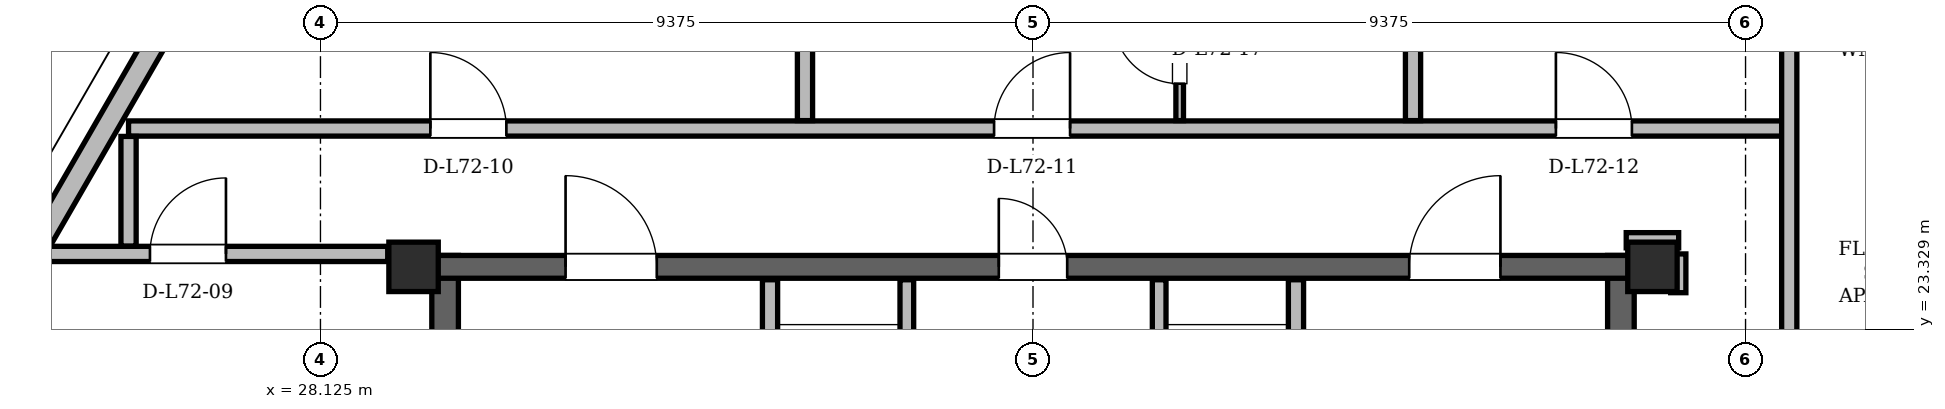
"""IFC4 building model, lengths in metres.
Left out: names, types, materials, properties, quantities, classifications, styles, units other than length and angle.
Written with IfcOpenShell. Run it as: python <this file> out.ifc"""

import sys

from ifc_helpers import new_model, si_unit, direction, frame, frame_2d, origin, origin_2d, place, context, subcontext, project, spatial, rectangle, hollow_rectangle, extrude, element, fill, save


model = new_model("IFC4")
c1 = context("Model", 3, precision=1e-05, world=origin(), true_north=direction((0.0, 1.0)))
c2 = subcontext(c1, "Body", "Model", "MODEL_VIEW")
j1 = project(units=[si_unit("LENGTHUNIT", "METRE"), si_unit("PLANEANGLEUNIT", "RADIAN")], contexts=[c1])
p1 = place(None, origin())
s1 = spatial("IfcSite", under=j1, at=p1, CompositionType="ELEMENT")
p2 = place(p1, origin())
s2 = spatial("IfcBuilding", under=s1, at=p2, CompositionType="ELEMENT")
p3 = place(p2, frame((0.0, 0.0, 273.3)))
s3 = spatial("IfcBuildingStorey", under=s2, at=p3, CompositionType="ELEMENT", Elevation=273.3)
for number, where, z_axis, x_axis in (
    (1, (45.65, 24.15, 0.0), (0.0, 0.0, 1.0), (1.0, 0.0, 0.0)),
    (2, (29.35, 24.15, 0.0), (0.0, 0.0, 1.0), (1.0, 0.0, 0.0)),
):
    element("IfcColumn", number, at=place(p3, frame(where, z_axis=z_axis, x_axis=x_axis)), inside=s3, PredefinedType="COLUMN", context=c2, shape_type="SweptSolid", body=[
        extrude(hollow_rectangle(XDim=0.65, YDim=0.65, WallThickness=0.05, at=origin_2d()), origin(), (0.0, 0.0, 1.0), 3.9),
    ])
for number, where, z_axis, x_axis in (
    (3, (29.765, 11.0, 0.0), (0.0, 0.0, 1.0), (0.0, 1.0, 0.0)),
    (4, (45.235, 11.0, 0.0), (0.0, 0.0, 1.0), (0.0, 1.0, 0.0)),
):
    element("IfcWall", number, at=place(p3, frame(where, z_axis=z_axis, x_axis=x_axis)), inside=s3, PredefinedType="SHEAR", context=c2, shape_type="SweptSolid", body=[
        extrude(rectangle(XDim=13.3, YDim=0.35, at=frame_2d((6.65, 0.0))), origin(), (0.0, 0.0, 1.0), 3.68),
    ])
p4 = place(p3, frame((29.65, 24.15, 0.0), z_axis=(0.0, 0.0, 1.0), x_axis=(1.0, 0.0, 0.0)))
e5 = element("IfcWall", 5, at=p4, inside=s3, PredefinedType="SHEAR", context=c2, shape_type="SweptSolid", body=[
    extrude(rectangle(XDim=15.7, YDim=0.3, at=frame_2d((7.85, 0.0))), origin(), (0.0, 0.0, 1.0), 3.68),
])
p5 = place(p4, frame((1.7, 0.0, 0.0)))
e6 = element("IfcOpeningElement", 6, at=p5, cuts=e5, PredefinedType="OPENING", context=c2, shape_type="SweptSolid", body=[
    extrude(rectangle(XDim=1.2, YDim=2.2, at=frame_2d((0.6, 1.1))), frame((0.0, 0.15, 0.0), z_axis=(0.0, -1.0, 0.0), x_axis=(1.0, 0.0, 0.0)), (0.0, 0.0, 1.0), 0.3),
])
p6 = place(p4, frame((12.8, 0.0, 0.0)))
e7 = element("IfcOpeningElement", 7, at=p6, cuts=e5, PredefinedType="OPENING", context=c2, shape_type="SweptSolid", body=[
    extrude(rectangle(XDim=1.2, YDim=2.2, at=frame_2d((0.6, 1.1))), frame((0.0, 0.15, 0.0), z_axis=(0.0, -1.0, 0.0), x_axis=(1.0, 0.0, 0.0)), (0.0, 0.0, 1.0), 0.3),
])
p7 = place(p4, frame((7.4, 0.0, 0.0)))
e8 = element("IfcOpeningElement", 8, at=p7, cuts=e5, PredefinedType="OPENING", context=c2, shape_type="SweptSolid", body=[
    extrude(rectangle(XDim=0.9, YDim=2.05, at=frame_2d((0.45, 1.025))), frame((0.0, 0.15, 0.0), z_axis=(0.0, -1.0, 0.0), x_axis=(1.0, 0.0, 0.0)), (0.0, 0.0, 1.0), 0.3),
])
p8 = place(p3, frame((58.532, 10.683, 0.0), z_axis=(0.0, 0.0, 1.0), x_axis=(-0.499999381892, 0.866025760649, 0.0)))
e9 = element("IfcWall", 9, at=p8, inside=s3, PredefinedType="SOLIDWALL", context=c2, shape_type="SweptSolid", body=[
    extrude(rectangle(XDim=37.343, YDim=0.29, at=frame_2d((18.671, 0.0))), origin(), (0.0, 0.0, 1.0), 3.058),
])
p9 = place(p8, frame((6.789, 0.0, 0.0)))
e10 = element("IfcOpeningElement", 10, at=p9, cuts=e9, PredefinedType="OPENING", context=c2, shape_type="SweptSolid", body=[
    extrude(rectangle(XDim=1.5, YDim=2.2, at=frame_2d((0.75, 1.1))), frame((0.0, 0.145, 0.0), z_axis=(0.0, -1.0, 0.0), x_axis=(1.0, 0.0, 0.0)), (0.0, 0.0, 1.0), 0.29),
])
p10 = place(p8, frame((27.808, 0.0, 0.0)))
e11 = element("IfcOpeningElement", 11, at=p10, cuts=e9, PredefinedType="OPENING", context=c2, shape_type="SweptSolid", body=[
    extrude(rectangle(XDim=1.5, YDim=2.2, at=frame_2d((0.75, 1.1))), frame((0.0, 0.145, 0.0), z_axis=(0.0, -1.0, 0.0), x_axis=(1.0, 0.0, 0.0)), (0.0, 0.0, 1.0), 0.29),
])
p11 = place(p8, frame((0.901, 0.0, 0.85)))
e12 = element("IfcOpeningElement", 12, at=p11, cuts=e9, PredefinedType="OPENING", context=c2, shape_type="SweptSolid", body=[
    extrude(rectangle(XDim=1.2, YDim=1.48, at=frame_2d((0.6, 0.74))), frame((0.0, 0.145, 0.0), z_axis=(0.0, -1.0, 0.0), x_axis=(1.0, 0.0, 0.0)), (0.0, 0.0, 1.0), 0.29),
])
p12 = place(p8, frame((12.688, 0.0, 0.85)))
e13 = element("IfcOpeningElement", 13, at=p12, cuts=e9, PredefinedType="OPENING", context=c2, shape_type="SweptSolid", body=[
    extrude(rectangle(XDim=3.0, YDim=2.098, at=frame_2d((1.5, 1.049))), frame((0.0, 0.145, 0.0), z_axis=(0.0, -1.0, 0.0), x_axis=(1.0, 0.0, 0.0)), (0.0, 0.0, 1.0), 0.29),
])
p13 = place(p8, frame((17.814, 0.0, 0.85)))
e14 = element("IfcOpeningElement", 14, at=p13, cuts=e9, PredefinedType="OPENING", context=c2, shape_type="SweptSolid", body=[
    extrude(rectangle(XDim=2.6, YDim=1.95, at=frame_2d((1.3, 0.975))), frame((0.0, 0.145, 0.0), z_axis=(0.0, -1.0, 0.0), x_axis=(1.0, 0.0, 0.0)), (0.0, 0.0, 1.0), 0.29),
])
p14 = place(p8, frame((35.362, 0.0, 0.85)))
e15 = element("IfcOpeningElement", 15, at=p14, cuts=e9, PredefinedType="OPENING", context=c2, shape_type="SweptSolid", body=[
    extrude(rectangle(XDim=1.2, YDim=1.48, at=frame_2d((0.6, 0.74))), frame((0.0, 0.145, 0.0), z_axis=(0.0, -1.0, 0.0), x_axis=(1.0, 0.0, 0.0)), (0.0, 0.0, 1.0), 0.29),
])
p15 = place(p8, frame((33.788, 0.0, 0.85)))
e16 = element("IfcOpeningElement", 16, at=p15, cuts=e9, PredefinedType="OPENING", context=c2, shape_type="SweptSolid", body=[
    extrude(rectangle(XDim=1.2, YDim=1.48, at=frame_2d((0.6, 0.74))), frame((0.0, 0.145, 0.0), z_axis=(0.0, -1.0, 0.0), x_axis=(1.0, 0.0, 0.0)), (0.0, 0.0, 1.0), 0.29),
])
p16 = place(p8, frame((22.74, 0.0, 0.85)))
e17 = element("IfcOpeningElement", 17, at=p16, cuts=e9, PredefinedType="OPENING", context=c2, shape_type="SweptSolid", body=[
    extrude(rectangle(XDim=1.2, YDim=1.48, at=frame_2d((0.6, 0.74))), frame((0.0, 0.145, 0.0), z_axis=(0.0, -1.0, 0.0), x_axis=(1.0, 0.0, 0.0)), (0.0, 0.0, 1.0), 0.29),
])
p17 = place(p8, frame((31.705, 0.0, 0.85)))
e18 = element("IfcOpeningElement", 18, at=p17, cuts=e9, PredefinedType="OPENING", context=c2, shape_type="SweptSolid", body=[
    extrude(rectangle(XDim=1.2, YDim=1.48, at=frame_2d((0.6, 0.74))), frame((0.0, 0.145, 0.0), z_axis=(0.0, -1.0, 0.0), x_axis=(1.0, 0.0, 0.0)), (0.0, 0.0, 1.0), 0.29),
])
p18 = place(p3, frame((35.139, 43.023, 0.0), z_axis=(0.0, 0.0, 1.0), x_axis=(-0.499999381892, -0.866025760649, 0.0)))
e19 = element("IfcWall", 19, at=p18, inside=s3, PredefinedType="SOLIDWALL", context=c2, shape_type="SweptSolid", body=[
    extrude(rectangle(XDim=37.343, YDim=0.29, at=frame_2d((18.671, 0.0))), origin(), (0.0, 0.0, 1.0), 3.058),
])
p19 = place(p18, frame((3.639, 0.0, 0.0)))
e20 = element("IfcOpeningElement", 20, at=p19, cuts=e19, PredefinedType="OPENING", context=c2, shape_type="SweptSolid", body=[
    extrude(rectangle(XDim=1.5, YDim=2.2, at=frame_2d((0.75, 1.1))), frame((0.0, 0.145, 0.0), z_axis=(0.0, -1.0, 0.0), x_axis=(1.0, 0.0, 0.0)), (0.0, 0.0, 1.0), 0.29),
])
p20 = place(p18, frame((27.809, 0.0, 0.0)))
e21 = element("IfcOpeningElement", 21, at=p20, cuts=e19, PredefinedType="OPENING", context=c2, shape_type="SweptSolid", body=[
    extrude(rectangle(XDim=1.5, YDim=2.2, at=frame_2d((0.75, 1.1))), frame((0.0, 0.145, 0.0), z_axis=(0.0, -1.0, 0.0), x_axis=(1.0, 0.0, 0.0)), (0.0, 0.0, 1.0), 0.29),
])
p21 = place(p18, frame((22.281, 0.0, 0.85)))
e22 = element("IfcOpeningElement", 22, at=p21, cuts=e19, PredefinedType="OPENING", context=c2, shape_type="SweptSolid", body=[
    extrude(rectangle(XDim=2.6, YDim=1.95, at=frame_2d((1.3, 0.975))), frame((0.0, 0.145, 0.0), z_axis=(0.0, -1.0, 0.0), x_axis=(1.0, 0.0, 0.0)), (0.0, 0.0, 1.0), 0.29),
])
p22 = place(p18, frame((33.866, 0.0, 0.85)))
e23 = element("IfcOpeningElement", 23, at=p22, cuts=e19, PredefinedType="OPENING", context=c2, shape_type="SweptSolid", body=[
    extrude(rectangle(XDim=2.4, YDim=1.9, at=frame_2d((1.2, 0.95))), frame((0.0, 0.145, 0.0), z_axis=(0.0, -1.0, 0.0), x_axis=(1.0, 0.0, 0.0)), (0.0, 0.0, 1.0), 0.29),
])
p23 = place(p18, frame((12.197, 0.0, 0.85)))
e24 = element("IfcOpeningElement", 24, at=p23, cuts=e19, PredefinedType="OPENING", context=c2, shape_type="SweptSolid", body=[
    extrude(rectangle(XDim=1.2, YDim=1.48, at=frame_2d((0.6, 0.74))), frame((0.0, 0.145, 0.0), z_axis=(0.0, -1.0, 0.0), x_axis=(1.0, 0.0, 0.0)), (0.0, 0.0, 1.0), 0.29),
])
p24 = place(p18, frame((16.635, 0.0, 0.85)))
e25 = element("IfcOpeningElement", 25, at=p24, cuts=e19, PredefinedType="OPENING", context=c2, shape_type="SweptSolid", body=[
    extrude(rectangle(XDim=1.6, YDim=1.7, at=frame_2d((0.8, 0.85))), frame((0.0, 0.145, 0.0), z_axis=(0.0, -1.0, 0.0), x_axis=(1.0, 0.0, 0.0)), (0.0, 0.0, 1.0), 0.29),
])
p25 = place(p18, frame((7.001, 0.0, 0.85)))
e26 = element("IfcOpeningElement", 26, at=p25, cuts=e19, PredefinedType="OPENING", context=c2, shape_type="SweptSolid", body=[
    extrude(rectangle(XDim=1.2, YDim=1.48, at=frame_2d((0.6, 0.74))), frame((0.0, 0.145, 0.0), z_axis=(0.0, -1.0, 0.0), x_axis=(1.0, 0.0, 0.0)), (0.0, 0.0, 1.0), 0.29),
])
p26 = place(p3, frame((34.04, 19.48, 0.0), z_axis=(0.0, 0.0, 1.0), x_axis=(0.0, 1.0, 0.0)))
e27 = element("IfcWall", 27, at=p26, inside=s3, PredefinedType="PARTITIONING", context=c2, shape_type="SweptSolid", body=[
    extrude(rectangle(XDim=4.5, YDim=0.2, at=frame_2d((2.25, 0.0))), origin(), (0.0, 0.0, 1.0), 3.68),
])
p27 = place(p26, frame((2.12, 0.0, 0.0)))
e28 = element("IfcOpeningElement", 28, at=p27, cuts=e27, PredefinedType="OPENING", context=c2, shape_type="SweptSolid", body=[
    extrude(rectangle(XDim=1.1, YDim=2.2, at=frame_2d((0.55, 1.1))), frame((0.0, 0.1, 0.0), z_axis=(0.0, -1.0, 0.0), x_axis=(1.0, 0.0, 0.0)), (0.0, 0.0, 1.0), 0.2),
])
p28 = place(p3, frame((35.84, 20.96, 0.0), z_axis=(0.0, 0.0, 1.0), x_axis=(0.0, 1.0, 0.0)))
e29 = element("IfcWall", 29, at=p28, inside=s3, PredefinedType="PARTITIONING", context=c2, shape_type="SweptSolid", body=[
    extrude(rectangle(XDim=3.02, YDim=0.18, at=frame_2d((1.51, 0.0))), origin(), (0.0, 0.0, 1.0), 3.68),
])
p29 = place(p3, frame((40.96, 19.48, 0.0), z_axis=(0.0, 0.0, 1.0), x_axis=(0.0, 1.0, 0.0)))
e30 = element("IfcWall", 30, at=p29, inside=s3, PredefinedType="PARTITIONING", context=c2, shape_type="SweptSolid", body=[
    extrude(rectangle(XDim=4.5, YDim=0.2, at=frame_2d((2.25, 0.0))), origin(), (0.0, 0.0, 1.0), 3.68),
])
p30 = place(p29, frame((2.12, 0.0, 0.0)))
e31 = element("IfcOpeningElement", 31, at=p30, cuts=e30, PredefinedType="OPENING", context=c2, shape_type="SweptSolid", body=[
    extrude(rectangle(XDim=1.1, YDim=2.2, at=frame_2d((0.55, 1.1))), frame((0.0, 0.1, 0.0), z_axis=(0.0, -1.0, 0.0), x_axis=(1.0, 0.0, 0.0)), (0.0, 0.0, 1.0), 0.2),
])
p31 = place(p3, frame((39.16, 20.96, 0.0), z_axis=(0.0, 0.0, 1.0), x_axis=(0.0, 1.0, 0.0)))
e32 = element("IfcWall", 32, at=p31, inside=s3, PredefinedType="PARTITIONING", context=c2, shape_type="SweptSolid", body=[
    extrude(rectangle(XDim=3.02, YDim=0.18, at=frame_2d((1.51, 0.0))), origin(), (0.0, 0.0, 1.0), 3.68),
])
p32 = place(p3, frame((24.513, 24.32, 0.0), z_axis=(0.0, 0.0, 1.0), x_axis=(1.0, 0.0, 0.0)))
e33 = element("IfcWall", 33, at=p32, inside=s3, PredefinedType="PARTITIONING", context=c2, shape_type="SweptSolid", body=[
    extrude(rectangle(XDim=4.497, YDim=0.2, at=frame_2d((2.249, 0.0))), origin(), (0.0, 0.0, 1.0), 3.68),
])
p33 = place(p32, frame((1.368, 0.0, 0.0)))
e34 = element("IfcOpeningElement", 34, at=p33, cuts=e33, PredefinedType="OPENING", context=c2, shape_type="SweptSolid", body=[
    extrude(rectangle(XDim=1.0, YDim=2.18, at=frame_2d((0.5, 1.09))), frame((0.0, 0.1, 0.0), z_axis=(0.0, -1.0, 0.0), x_axis=(1.0, 0.0, 0.0)), (0.0, 0.0, 1.0), 0.2),
])
p34 = place(p3, frame((45.305, 24.5, 0.0), z_axis=(0.0, 0.0, 1.0), x_axis=(1.0, 0.0, 0.0)))
e35 = element("IfcWall", 35, at=p34, inside=s3, PredefinedType="PARTITIONING", context=c2, shape_type="SweptSolid", body=[
    extrude(rectangle(XDim=0.69, YDim=0.2, at=frame_2d((0.345, 0.0))), origin(), (0.0, 0.0, 1.0), 3.266),
])
p35 = place(p3, frame((25.6, 25.97, 0.0), z_axis=(0.0, 0.0, 1.0), x_axis=(1.0, 0.0, 0.0)))
e36 = element("IfcWall", 36, at=p35, inside=s3, PredefinedType="PARTITIONING", context=c2, shape_type="SweptSolid", body=[
    extrude(rectangle(XDim=21.85, YDim=0.2, at=frame_2d((10.925, 0.0))), origin(), (0.0, 0.0, 1.0), 3.266),
])
p36 = place(p35, frame((3.971, 0.0, 0.0)))
e37 = element("IfcOpeningElement", 37, at=p36, cuts=e36, PredefinedType="OPENING", context=c2, shape_type="SweptSolid", body=[
    extrude(rectangle(XDim=1.0, YDim=2.18, at=frame_2d((0.5, 1.09))), frame((0.0, 0.1, 0.0), z_axis=(0.0, -1.0, 0.0), x_axis=(1.0, 0.0, 0.0)), (0.0, 0.0, 1.0), 0.2),
])
p37 = place(p35, frame((11.388, 0.0, 0.0)))
e38 = element("IfcOpeningElement", 38, at=p37, cuts=e36, PredefinedType="OPENING", context=c2, shape_type="SweptSolid", body=[
    extrude(rectangle(XDim=1.0, YDim=2.18, at=frame_2d((0.5, 1.09))), frame((0.0, 0.1, 0.0), z_axis=(0.0, -1.0, 0.0), x_axis=(1.0, 0.0, 0.0)), (0.0, 0.0, 1.0), 0.2),
])
p38 = place(p35, frame((18.78, 0.0, 0.0)))
e39 = element("IfcOpeningElement", 39, at=p38, cuts=e36, PredefinedType="OPENING", context=c2, shape_type="SweptSolid", body=[
    extrude(rectangle(XDim=1.0, YDim=2.18, at=frame_2d((0.5, 1.09))), frame((0.0, 0.1, 0.0), z_axis=(0.0, -1.0, 0.0), x_axis=(1.0, 0.0, 0.0)), (0.0, 0.0, 1.0), 0.2),
])
p39 = place(p3, frame((25.6, 24.424, 0.0), z_axis=(0.0, 0.0, 1.0), x_axis=(0.0, 1.0, 0.0)))
e40 = element("IfcWall", 40, at=p39, inside=s3, PredefinedType="PARTITIONING", context=c2, shape_type="SweptSolid", body=[
    extrude(rectangle(XDim=1.442, YDim=0.2, at=frame_2d((0.721, 0.0))), origin(), (0.0, 0.0, 1.0), 3.68),
])
p40 = place(p3, frame((34.5, 26.074, 0.0), z_axis=(0.0, 0.0, 1.0), x_axis=(0.0, 1.0, 0.0)))
e41 = element("IfcWall", 41, at=p40, inside=s3, PredefinedType="PARTITIONING", context=c2, shape_type="SweptSolid", body=[
    extrude(rectangle(XDim=15.544, YDim=0.2, at=frame_2d((7.772, 0.0))), origin(), (0.0, 0.0, 1.0), 3.058),
])
p41 = place(p3, frame((39.43, 26.074, 0.0), z_axis=(0.0, 0.0, 1.0), x_axis=(0.0, 1.0, 0.0)))
e42 = element("IfcWall", 42, at=p41, inside=s3, PredefinedType="PARTITIONING", context=c2, shape_type="SweptSolid", body=[
    extrude(rectangle(XDim=16.8, YDim=0.1, at=frame_2d((8.4, 0.0))), origin(), (0.0, 0.0, 1.0), 3.68),
])
p42 = place(p41, frame((0.486, 0.0, 0.0)))
e43 = element("IfcOpeningElement", 43, at=p42, cuts=e42, PredefinedType="OPENING", context=c2, shape_type="SweptSolid", body=[
    extrude(rectangle(XDim=0.88, YDim=2.08, at=frame_2d((0.44, 1.04))), frame((0.0, 0.05, 0.0), z_axis=(0.0, -1.0, 0.0), x_axis=(1.0, 0.0, 0.0)), (0.0, 0.0, 1.0), 0.1),
])
p43 = place(p41, frame((3.036, 0.0, 0.0)))
e44 = element("IfcOpeningElement", 44, at=p43, cuts=e42, PredefinedType="OPENING", context=c2, shape_type="SweptSolid", body=[
    extrude(rectangle(XDim=0.95, YDim=2.1, at=frame_2d((0.475, 1.05))), frame((0.0, 0.05, 0.0), z_axis=(0.0, -1.0, 0.0), x_axis=(1.0, 0.0, 0.0)), (0.0, 0.0, 1.0), 0.1),
])
p44 = place(p41, frame((5.74, 0.0, 0.0)))
e45 = element("IfcOpeningElement", 45, at=p44, cuts=e42, PredefinedType="OPENING", context=c2, shape_type="SweptSolid", body=[
    extrude(rectangle(XDim=0.95, YDim=2.1, at=frame_2d((0.475, 1.05))), frame((0.0, 0.05, 0.0), z_axis=(0.0, -1.0, 0.0), x_axis=(1.0, 0.0, 0.0)), (0.0, 0.0, 1.0), 0.1),
])
p45 = place(p41, frame((8.217, 0.0, 0.0)))
e46 = element("IfcOpeningElement", 46, at=p45, cuts=e42, PredefinedType="OPENING", context=c2, shape_type="SweptSolid", body=[
    extrude(rectangle(XDim=0.95, YDim=2.1, at=frame_2d((0.475, 1.05))), frame((0.0, 0.05, 0.0), z_axis=(0.0, -1.0, 0.0), x_axis=(1.0, 0.0, 0.0)), (0.0, 0.0, 1.0), 0.1),
])
p46 = place(p41, frame((11.18, 0.0, 0.0)))
e47 = element("IfcOpeningElement", 47, at=p46, cuts=e42, PredefinedType="OPENING", context=c2, shape_type="SweptSolid", body=[
    extrude(rectangle(XDim=0.92, YDim=2.12, at=frame_2d((0.46, 1.06))), frame((0.0, 0.05, 0.0), z_axis=(0.0, -1.0, 0.0), x_axis=(1.0, 0.0, 0.0)), (0.0, 0.0, 1.0), 0.1),
])
p47 = place(p41, frame((14.585, 0.0, 0.0)))
e48 = element("IfcOpeningElement", 48, at=p47, cuts=e42, PredefinedType="OPENING", context=c2, shape_type="SweptSolid", body=[
    extrude(rectangle(XDim=0.95, YDim=2.1, at=frame_2d((0.475, 1.05))), frame((0.0, 0.05, 0.0), z_axis=(0.0, -1.0, 0.0), x_axis=(1.0, 0.0, 0.0)), (0.0, 0.0, 1.0), 0.1),
])
p48 = place(p3, frame((42.5, 26.074, 0.0), z_axis=(0.0, 0.0, 1.0), x_axis=(0.0, 1.0, 0.0)))
e49 = element("IfcWall", 49, at=p48, inside=s3, PredefinedType="PARTITIONING", context=c2, shape_type="SweptSolid", body=[
    extrude(rectangle(XDim=12.08, YDim=0.2, at=frame_2d((6.04, 0.0))), origin(), (0.0, 0.0, 1.0), 3.058),
])
p49 = place(p3, frame((45.99, 23.81, 0.0), z_axis=(0.0, 0.0, 1.0), x_axis=(0.0, 1.0, 0.0)))
e50 = element("IfcWall", 50, at=p49, inside=s3, PredefinedType="PARTITIONING", context=c2, shape_type="SweptSolid", body=[
    extrude(rectangle(XDim=0.51, YDim=0.2, at=frame_2d((0.255, 0.0))), origin(), (0.0, 0.0, 1.0), 3.68),
])
p50 = place(p3, frame((47.45, 6.743, 0.0), z_axis=(0.0, 0.0, 1.0), x_axis=(0.0, 1.0, 0.0)))
e51 = element("IfcWall", 51, at=p50, inside=s3, PredefinedType="PARTITIONING", context=c2, shape_type="SweptSolid", body=[
    extrude(rectangle(XDim=22.837, YDim=0.2, at=frame_2d((11.418, 0.0))), origin(), (0.0, 0.0, 1.0), 3.058),
])
p51 = place(p50, frame((7.153, 0.0, 0.0)))
e52 = element("IfcOpeningElement", 52, at=p51, cuts=e51, PredefinedType="OPENING", context=c2, shape_type="SweptSolid", body=[
    extrude(rectangle(XDim=1.0, YDim=2.18, at=frame_2d((0.5, 1.09))), frame((0.0, 0.1, 0.0), z_axis=(0.0, -1.0, 0.0), x_axis=(1.0, 0.0, 0.0)), (0.0, 0.0, 1.0), 0.2),
])
p52 = place(p50, frame((15.139, 0.0, 0.0)))
e53 = element("IfcOpeningElement", 53, at=p52, cuts=e51, PredefinedType="OPENING", context=c2, shape_type="SweptSolid", body=[
    extrude(rectangle(XDim=1.0, YDim=2.18, at=frame_2d((0.5, 1.09))), frame((0.0, 0.1, 0.0), z_axis=(0.0, -1.0, 0.0), x_axis=(1.0, 0.0, 0.0)), (0.0, 0.0, 1.0), 0.2),
])
p53 = place(p13, origin())
e54 = element("IfcWindow", 54, at=p53, inside=s3, PartitioningType="SINGLE_PANEL", PredefinedType="WINDOW", context=c2, shape_type="SweptSolid", body=[
    extrude(rectangle(XDim=2.6, YDim=1.95, at=frame_2d((1.3, 0.975))), frame((0.0, 0.03, 0.0), z_axis=(0.0, -1.0, 0.0), x_axis=(1.0, 0.0, 0.0)), (0.0, 0.0, 1.0), 0.06),
])
fill(e14, e54)
p54 = place(p5, origin())
e55 = element("IfcDoor", 55, at=p54, inside=s3, OperationType="SINGLE_SWING_LEFT", PredefinedType="DOOR", context=c2, shape_type="SweptSolid", body=[
    extrude(rectangle(XDim=1.2, YDim=2.2, at=frame_2d((0.6, 1.1))), frame((0.0, 0.025, 0.0), z_axis=(0.0, -1.0, 0.0), x_axis=(1.0, 0.0, 0.0)), (0.0, 0.0, 1.0), 0.05),
])
fill(e6, e55)
p55 = place(p6, origin())
e56 = element("IfcDoor", 56, at=p55, inside=s3, OperationType="SINGLE_SWING_RIGHT", PredefinedType="DOOR", context=c2, shape_type="SweptSolid", body=[
    extrude(rectangle(XDim=1.2, YDim=2.2, at=frame_2d((0.6, 1.1))), frame((0.0, 0.025, 0.0), z_axis=(0.0, -1.0, 0.0), x_axis=(1.0, 0.0, 0.0)), (0.0, 0.0, 1.0), 0.05),
])
fill(e7, e56)
p56 = place(p7, origin())
e57 = element("IfcDoor", 57, at=p56, inside=s3, OperationType="SINGLE_SWING_LEFT", PredefinedType="DOOR", context=c2, shape_type="SweptSolid", body=[
    extrude(rectangle(XDim=0.9, YDim=2.05, at=frame_2d((0.45, 1.025))), frame((0.0, 0.025, 0.0), z_axis=(0.0, -1.0, 0.0), x_axis=(1.0, 0.0, 0.0)), (0.0, 0.0, 1.0), 0.05),
])
fill(e8, e57)
p57 = place(p33, origin())
e58 = element("IfcDoor", 58, at=p57, inside=s3, OperationType="SINGLE_SWING_RIGHT", PredefinedType="DOOR", context=c2, shape_type="SweptSolid", body=[
    extrude(rectangle(XDim=1.0, YDim=2.18, at=frame_2d((0.5, 1.09))), frame((0.0, 0.025, 0.0), z_axis=(0.0, -1.0, 0.0), x_axis=(1.0, 0.0, 0.0)), (0.0, 0.0, 1.0), 0.05),
])
fill(e34, e58)
p58 = place(p36, origin())
e59 = element("IfcDoor", 59, at=p58, inside=s3, OperationType="SINGLE_SWING_LEFT", PredefinedType="DOOR", context=c2, shape_type="SweptSolid", body=[
    extrude(rectangle(XDim=1.0, YDim=2.18, at=frame_2d((0.5, 1.09))), frame((0.0, 0.025, 0.0), z_axis=(0.0, -1.0, 0.0), x_axis=(1.0, 0.0, 0.0)), (0.0, 0.0, 1.0), 0.05),
])
fill(e37, e59)
p59 = place(p37, origin())
e60 = element("IfcDoor", 60, at=p59, inside=s3, OperationType="SINGLE_SWING_RIGHT", PredefinedType="DOOR", context=c2, shape_type="SweptSolid", body=[
    extrude(rectangle(XDim=1.0, YDim=2.18, at=frame_2d((0.5, 1.09))), frame((0.0, 0.025, 0.0), z_axis=(0.0, -1.0, 0.0), x_axis=(1.0, 0.0, 0.0)), (0.0, 0.0, 1.0), 0.05),
])
fill(e38, e60)
p60 = place(p38, origin())
e61 = element("IfcDoor", 61, at=p60, inside=s3, OperationType="SINGLE_SWING_LEFT", PredefinedType="DOOR", context=c2, shape_type="SweptSolid", body=[
    extrude(rectangle(XDim=1.0, YDim=2.18, at=frame_2d((0.5, 1.09))), frame((0.0, 0.025, 0.0), z_axis=(0.0, -1.0, 0.0), x_axis=(1.0, 0.0, 0.0)), (0.0, 0.0, 1.0), 0.05),
])
fill(e39, e61)
p61 = place(p42, origin())
e62 = element("IfcDoor", 62, at=p61, inside=s3, OperationType="SINGLE_SWING_RIGHT", PredefinedType="DOOR", context=c2, shape_type="SweptSolid", body=[
    extrude(rectangle(XDim=0.88, YDim=2.08, at=frame_2d((0.44, 1.04))), frame((0.0, 0.025, 0.0), z_axis=(0.0, -1.0, 0.0), x_axis=(1.0, 0.0, 0.0)), (0.0, 0.0, 1.0), 0.05),
])
fill(e43, e62)
save(model, sys.argv[1])
